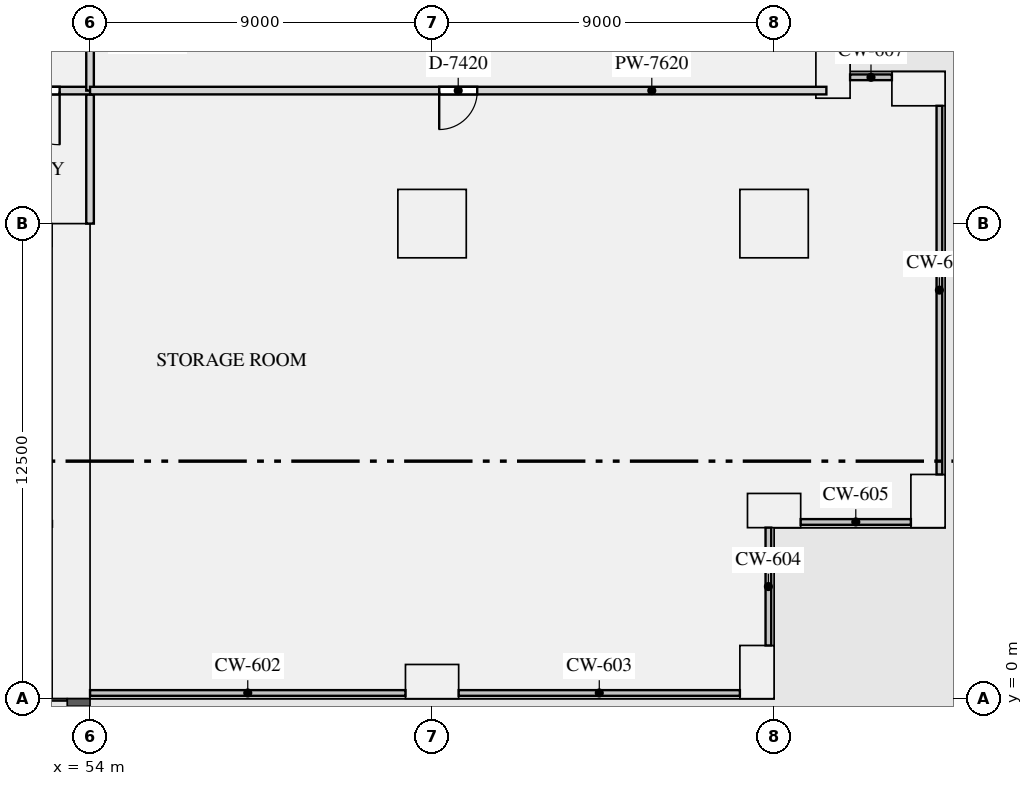
"""IFC4 building model, lengths in metres.
Left out: names, types, materials, properties, quantities, classifications, styles, units other than length and angle.
Written with IfcOpenShell. Run it as: python <this file> out.ifc"""

import sys

from ifc_helpers import new_model, si_unit, direction, frame, frame_2d, origin, origin_2d, place, context, subcontext, project, spatial, rectangle, extrude, element, fill, save


model = new_model("IFC4")
c1 = context("Model", 3, precision=1e-05, world=origin(), true_north=direction((0.0, 1.0)))
c2 = subcontext(c1, "Body", "Model", "MODEL_VIEW")
j1 = project(units=[si_unit("LENGTHUNIT", "METRE"), si_unit("PLANEANGLEUNIT", "RADIAN")], contexts=[c1])
p1 = place(None, origin())
s1 = spatial("IfcSite", under=j1, at=p1, CompositionType="ELEMENT")
p2 = place(p1, origin())
s2 = spatial("IfcBuilding", under=s1, at=p2, CompositionType="ELEMENT")
p3 = place(p2, frame((0.0, 0.0, 11.0)))
s3 = spatial("IfcBuildingStorey", under=s2, at=p3, CompositionType="ELEMENT", Elevation=11.0)
for number, where, z_axis, x_axis in (
    (1, (63.0, 0.45, 0.0), (0.0, 0.0, 1.0), (1.0, 0.0, 0.0)),
    (2, (71.55, 0.7, 0.0), (0.0, 0.0, 1.0), (0.0, 1.0, 0.0)),
    (3, (72.0, 4.95, 0.0), (0.0, 0.0, 1.0), (1.0, 0.0, 0.0)),
    (4, (76.05, 5.2, 0.0), (0.0, 0.0, 1.0), (0.0, 1.0, 0.0)),
    (5, (75.8, 16.05, 0.0), (0.0, 0.0, 1.0), (-1.0, 0.0, 0.0)),
    (6, (73.55, 16.5, 0.0), (0.0, 0.0, 1.0), (0.0, 1.0, 0.0)),
):
    element("IfcColumn", number, at=place(p3, frame(where, z_axis=z_axis, x_axis=x_axis)), inside=s3, PredefinedType="USERDEFINED", context=c2, shape_type="SweptSolid", body=[
        extrude(rectangle(XDim=1.4, YDim=0.9, at=origin_2d()), origin(), (0.0, 0.0, 1.0), 4.5),
    ])
for number, where, z_axis, x_axis in (
    (7, (63.0, 12.5, 0.0), (0.0, 0.0, 1.0), (1.0, 0.0, 0.0)),
    (8, (72.0, 12.5, 0.0), (0.0, 0.0, 1.0), (1.0, 0.0, 0.0)),
):
    element("IfcColumn", number, at=place(p3, frame(where, z_axis=z_axis, x_axis=x_axis)), inside=s3, PredefinedType="COLUMN", context=c2, shape_type="SweptSolid", body=[
        extrude(rectangle(XDim=1.8, YDim=1.8, at=origin_2d()), origin(), (0.0, 0.0, 1.0), 4.5),
    ])
p4 = place(p3, frame((53.5, 0.0, 0.0), z_axis=(0.0, 0.0, 1.0), x_axis=(0.0, 1.0, 0.0)))
e9 = element("IfcWall", 9, at=p4, inside=s3, PredefinedType="SHEAR", context=c2, shape_type="SweptSolid", body=[
    extrude(rectangle(XDim=12.5, YDim=1.0, at=frame_2d((6.25, 0.0))), origin(), (0.0, 0.0, 1.0), 4.5),
])
p5 = place(p3, frame((54.0, 12.5, 0.0), z_axis=(0.0, 0.0, 1.0), x_axis=(0.0, 1.0, 0.0)))
e10 = element("IfcWall", 10, at=p5, inside=s3, PredefinedType="PARTITIONING", context=c2, shape_type="SweptSolid", body=[
    extrude(rectangle(XDim=3.4, YDim=0.2, at=frame_2d((1.7, 0.0))), origin(), (0.0, 0.0, 1.0), 3.9),
])
p6 = place(p3, frame((17.9, 16.0, 0.0), z_axis=(0.0, 0.0, 1.0), x_axis=(1.0, 0.0, 0.0)))
e11 = element("IfcWall", 11, at=p6, inside=s3, PredefinedType="PARTITIONING", context=c2, shape_type="SweptSolid", body=[
    extrude(rectangle(XDim=36.2, YDim=0.2, at=frame_2d((18.1, 0.0))), origin(), (0.0, 0.0, 1.0), 3.9),
])
p7 = place(p6, frame((0.9, 0.0, 0.0)))
e12 = element("IfcOpeningElement", 12, at=p7, cuts=e11, PredefinedType="OPENING", context=c2, shape_type="SweptSolid", body=[
    extrude(rectangle(XDim=1.4, YDim=2.1, at=frame_2d((0.7, 1.05))), frame((0.0, 0.11, 0.0), z_axis=(0.0, -1.0, 0.0), x_axis=(1.0, 0.0, 0.0)), (0.0, 0.0, 1.0), 0.22),
])
p8 = place(p6, frame((33.9, 0.0, 0.0)))
e13 = element("IfcOpeningElement", 13, at=p8, cuts=e11, PredefinedType="OPENING", context=c2, shape_type="SweptSolid", body=[
    extrude(rectangle(XDim=1.4, YDim=2.1, at=frame_2d((0.7, 1.05))), frame((0.0, 0.11, 0.0), z_axis=(0.0, -1.0, 0.0), x_axis=(1.0, 0.0, 0.0)), (0.0, 0.0, 1.0), 0.22),
])
p9 = place(p3, frame((54.0, 16.0, 0.0), z_axis=(0.0, 0.0, 1.0), x_axis=(0.0, 1.0, 0.0)))
e14 = element("IfcWall", 14, at=p9, inside=s3, PredefinedType="PARTITIONING", context=c2, shape_type="SweptSolid", body=[
    extrude(rectangle(XDim=7.0, YDim=0.2, at=frame_2d((3.5, 0.0))), origin(), (0.0, 0.0, 1.0), 3.9),
])
p10 = place(p9, frame((2.6, 0.0, 0.0)))
e15 = element("IfcOpeningElement", 15, at=p10, cuts=e14, PredefinedType="OPENING", context=c2, shape_type="SweptSolid", body=[
    extrude(rectangle(XDim=1.8, YDim=2.4, at=frame_2d((0.9, 1.2))), frame((0.0, 0.11, 0.0), z_axis=(0.0, -1.0, 0.0), x_axis=(1.0, 0.0, 0.0)), (0.0, 0.0, 1.0), 0.22),
])
p11 = place(p3, frame((54.0, 16.0, 0.0), z_axis=(0.0, 0.0, 1.0), x_axis=(1.0, 0.0, 0.0)))
e16 = element("IfcWall", 16, at=p11, inside=s3, PredefinedType="PARTITIONING", context=c2, shape_type="SweptSolid", body=[
    extrude(rectangle(XDim=19.376, YDim=0.2, at=frame_2d((9.688, 0.0))), origin(), (0.0, 0.0, 1.0), 3.9),
])
p12 = place(p11, frame((9.188, 0.0, 0.0)))
e17 = element("IfcOpeningElement", 17, at=p12, cuts=e16, PredefinedType="OPENING", context=c2, shape_type="SweptSolid", body=[
    extrude(rectangle(XDim=1.0, YDim=2.1, at=frame_2d((0.5, 1.05))), frame((0.0, 0.11, 0.0), z_axis=(0.0, -1.0, 0.0), x_axis=(1.0, 0.0, 0.0)), (0.0, 0.0, 1.0), 0.22),
])
p13 = place(p8, frame((1.4, 0.0, 0.0), z_axis=(0.0, 0.0, 1.0), x_axis=(-1.0, 0.0, 0.0)))
e18 = element("IfcDoor", 18, at=p13, inside=s3, OperationType="SINGLE_SWING_LEFT", PredefinedType="DOOR", context=c2, shape_type="SweptSolid", body=[
    extrude(rectangle(XDim=1.4, YDim=2.1, at=frame_2d((0.7, 1.05))), frame((0.0, 0.025, 0.0), z_axis=(0.0, -1.0, 0.0), x_axis=(1.0, 0.0, 0.0)), (0.0, 0.0, 1.0), 0.05),
])
fill(e13, e18)
p14 = place(p12, frame((1.0, 0.0, 0.0), z_axis=(0.0, 0.0, 1.0), x_axis=(-1.0, 0.0, 0.0)))
e19 = element("IfcDoor", 19, at=p14, inside=s3, OperationType="SINGLE_SWING_RIGHT", PredefinedType="DOOR", context=c2, shape_type="SweptSolid", body=[
    extrude(rectangle(XDim=1.0, YDim=2.1, at=frame_2d((0.5, 1.05))), frame((0.0, 0.025, 0.0), z_axis=(0.0, -1.0, 0.0), x_axis=(1.0, 0.0, 0.0)), (0.0, 0.0, 1.0), 0.05),
])
fill(e17, e19)
save(model, sys.argv[1])
